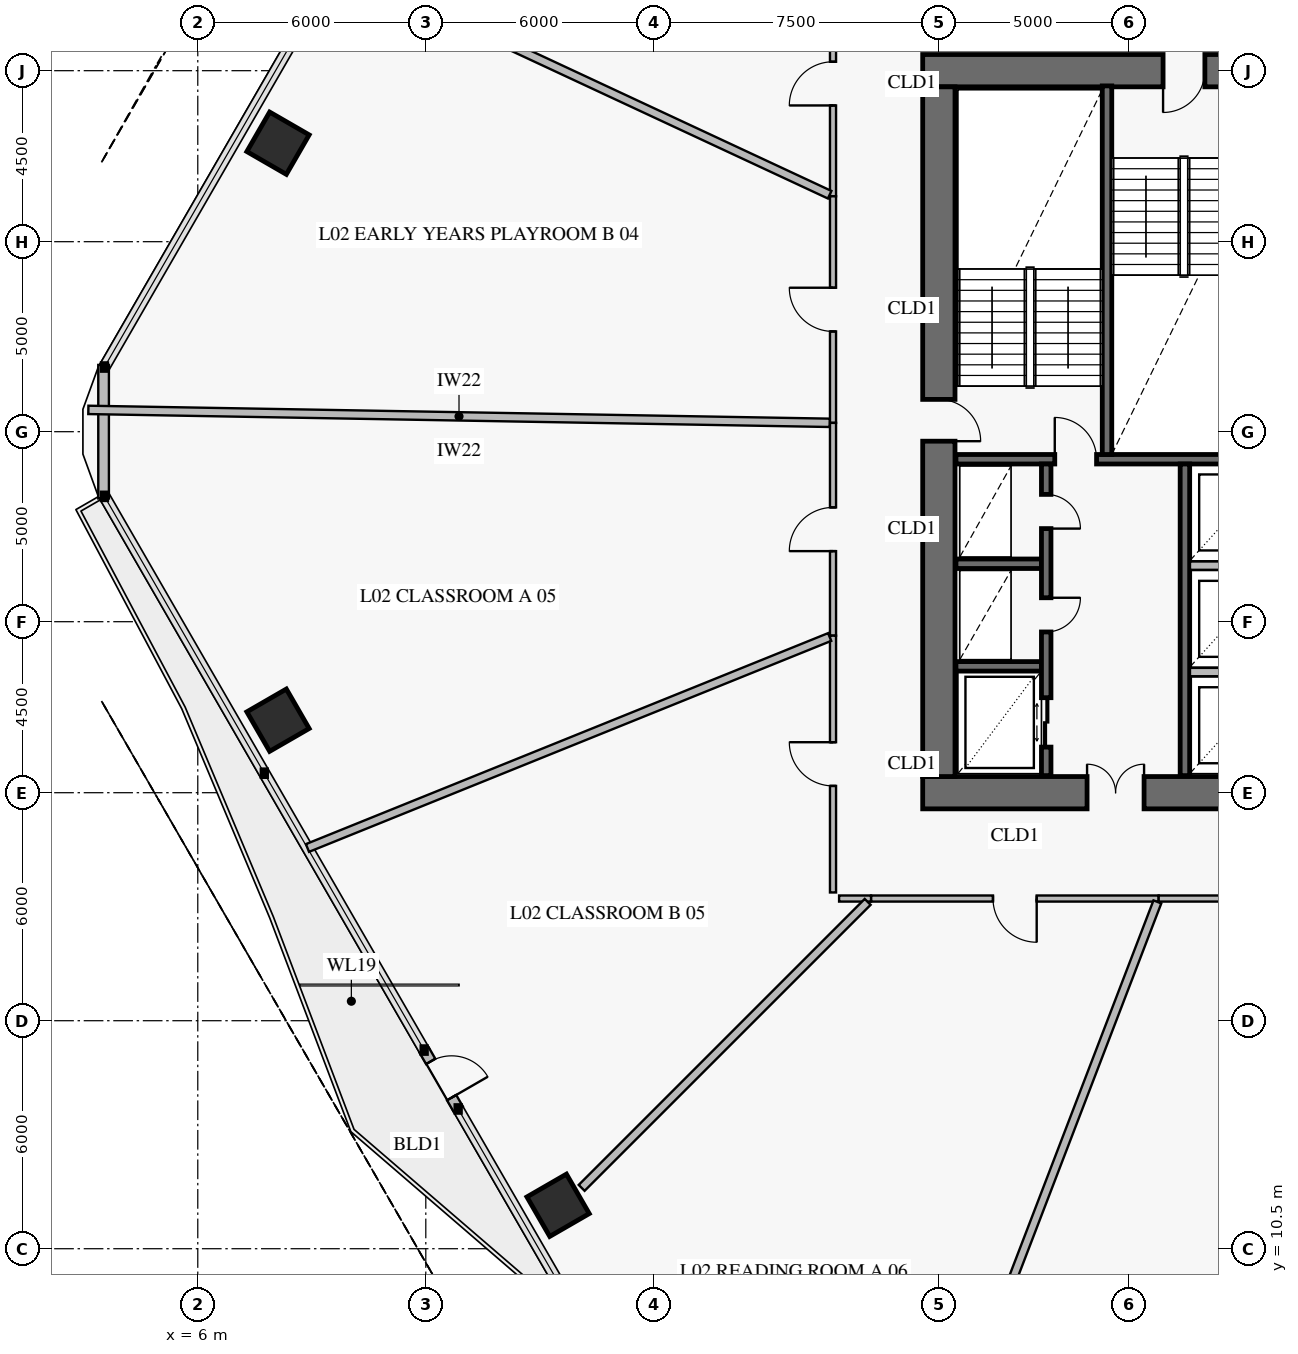
"""IFC4 building model, lengths in metres.
Left out: names, types, materials, properties, quantities, classifications, styles, units other than length and angle.
Written with IfcOpenShell. Run it as: python <this file> out.ifc"""

import sys

from ifc_helpers import new_model, si_unit, direction, frame, frame_2d, origin, origin_2d, place, context, subcontext, project, spatial, rectangle, extrude, element, fill, save


model = new_model("IFC4")
c1 = context("Model", 3, precision=1e-05, world=origin(), true_north=direction((0.0, 1.0)))
c2 = subcontext(c1, "Body", "Model", "MODEL_VIEW")
j1 = project(units=[si_unit("LENGTHUNIT", "METRE"), si_unit("PLANEANGLEUNIT", "RADIAN")], contexts=[c1])
p1 = place(None, origin())
s1 = spatial("IfcSite", under=j1, at=p1, CompositionType="ELEMENT")
p2 = place(p1, origin())
s2 = spatial("IfcBuilding", under=s1, at=p2, CompositionType="ELEMENT")
p3 = place(p2, frame((0.0, 0.0, 7.8)))
s3 = spatial("IfcBuildingStorey", under=s2, at=p3, CompositionType="ELEMENT", Elevation=7.8)
p4 = place(p3, frame((25.075, 22.5, 0.0), z_axis=(0.0, 0.0, 1.0), x_axis=(1.0, 0.0, 0.0)))
e1 = element("IfcWall", 1, at=p4, inside=s3, PredefinedType="SHEAR", context=c2, shape_type="SweptSolid", body=[
    extrude(rectangle(XDim=9.975, YDim=0.85, at=frame_2d((4.988, 0.0))), origin(), (0.0, 0.0, 1.0), 4.2),
])
p5 = place(p4, frame((4.325, 0.0, 0.0)))
e2 = element("IfcOpeningElement", 2, at=p5, cuts=e1, PredefinedType="OPENING", context=c2, shape_type="SweptSolid", body=[
    extrude(rectangle(XDim=1.5, YDim=2.15, at=frame_2d((0.75, 1.075))), frame((0.0, 0.437, 0.0), z_axis=(0.0, -1.0, 0.0), x_axis=(1.0, 0.0, 0.0)), (0.0, 0.0, 1.0), 0.874),
])
p6 = place(p3, frame((36.75, 41.5, 0.0), z_axis=(0.0, 0.0, 1.0), x_axis=(-1.0, 0.0, 0.0)))
e3 = element("IfcWall", 3, at=p6, inside=s3, PredefinedType="SHEAR", context=c2, shape_type="SweptSolid", body=[
    extrude(rectangle(XDim=11.675, YDim=0.85, at=frame_2d((5.837, 0.0))), origin(), (0.0, 0.0, 1.0), 4.2),
])
p7 = place(p6, frame((4.25, 0.0, 0.0)))
e4 = element("IfcOpeningElement", 4, at=p7, cuts=e3, PredefinedType="OPENING", context=c2, shape_type="SweptSolid", body=[
    extrude(rectangle(XDim=1.1, YDim=2.15, at=frame_2d((0.55, 1.075))), frame((0.0, 0.437, 0.0), z_axis=(0.0, -1.0, 0.0), x_axis=(1.0, 0.0, 0.0)), (0.0, 0.0, 1.0), 0.874),
])
p8 = place(p3, frame((25.5, 22.925, 0.0), z_axis=(0.0, 0.0, 1.0), x_axis=(0.0, 1.0, 0.0)))
e5 = element("IfcWall", 5, at=p8, inside=s3, PredefinedType="SHEAR", context=c2, shape_type="SweptSolid", body=[
    extrude(rectangle(XDim=18.15, YDim=0.85, at=frame_2d((9.075, 0.0))), origin(), (0.0, 0.0, 1.0), 4.2),
])
p9 = place(p8, frame((8.825, 0.0, 0.0)))
e6 = element("IfcOpeningElement", 6, at=p9, cuts=e5, PredefinedType="OPENING", context=c2, shape_type="SweptSolid", body=[
    extrude(rectangle(XDim=1.1, YDim=2.15, at=frame_2d((0.55, 1.075))), frame((0.0, 0.437, 0.0), z_axis=(0.0, -1.0, 0.0), x_axis=(1.0, 0.0, 0.0)), (0.0, 0.0, 1.0), 0.874),
])
for number, where, z_axis, x_axis in (
    (7, (8.111, 39.592, 0.0), (0.0, 0.0, 1.0), (-0.5, -0.866, 0.0)),
    (8, (8.111, 24.408, 0.0), (0.0, 0.0, 1.0), (0.5, -0.866, 0.0)),
    (9, (15.481, 11.643, 0.0), (0.0, 0.0, 1.0), (0.5, -0.866, 0.0)),
):
    element("IfcColumn", number, at=place(p3, frame(where, z_axis=z_axis, x_axis=x_axis)), inside=s3, PredefinedType="COLUMN", context=c2, shape_type="SweptSolid", body=[
        extrude(rectangle(XDim=1.2, YDim=1.2, at=origin_2d()), origin(), (0.0, 0.0, 1.0), 3.92),
    ])
p10 = place(p3, frame((12.852, 14.177, 0.0), z_axis=(0.0, 0.0, 1.0), x_axis=(-0.499982180423, 0.866035691677, 0.0)))
e10 = element("IfcWall", 10, at=p10, inside=s3, PredefinedType="SOLIDWALL", context=c2, shape_type="SweptSolid", body=[
    extrude(rectangle(XDim=1.79, YDim=0.28, at=frame_2d((0.895, 0.0))), origin(), (0.0, 0.0, 1.0), 3.92),
])
p11 = place(p10, frame((0.345, 0.0, 0.0)))
e11 = element("IfcOpeningElement", 11, at=p11, cuts=e10, PredefinedType="OPENING", context=c2, shape_type="SweptSolid", body=[
    extrude(rectangle(XDim=1.1, YDim=2.2, at=frame_2d((0.55, 1.1))), frame((0.0, 0.152, 0.0), z_axis=(0.0, -1.0, 0.0), x_axis=(1.0, 0.0, 0.0)), (0.0, 0.0, 1.0), 0.304),
])
p12 = place(p3, frame((3.521, 30.242, 0.0), z_axis=(0.0, 0.0, 1.0), x_axis=(0.0, 1.0, 0.0)))
e12 = element("IfcWall", 12, at=p12, inside=s3, PredefinedType="SOLIDWALL", context=c2, shape_type="SweptSolid", body=[
    extrude(rectangle(XDim=3.515, YDim=0.28, at=frame_2d((1.758, 0.0))), origin(), (0.0, 0.0, 1.0), 3.92),
])
p13 = place(p3, frame((25.95, 31.275, 0.0), z_axis=(0.0, 0.0, 1.0), x_axis=(1.0, 0.0, 0.0)))
e13 = element("IfcWall", 13, at=p13, inside=s3, PredefinedType="SOLIDWALL", context=c2, shape_type="SweptSolid", body=[
    extrude(rectangle(XDim=20.1, YDim=0.25, at=frame_2d((10.05, 0.0))), origin(), (0.0, 0.0, 1.0), 4.2),
])
p14 = place(p13, frame((2.6, 0.0, 0.0)))
e14 = element("IfcOpeningElement", 14, at=p14, cuts=e13, PredefinedType="OPENING", context=c2, shape_type="SweptSolid", body=[
    extrude(rectangle(XDim=1.1, YDim=2.15, at=frame_2d((0.55, 1.075))), frame((0.0, 0.137, 0.0), z_axis=(0.0, -1.0, 0.0), x_axis=(1.0, 0.0, 0.0)), (0.0, 0.0, 1.0), 0.274),
])
p15 = place(p13, frame((10.6, 0.0, 0.0)))
e15 = element("IfcOpeningElement", 15, at=p15, cuts=e13, PredefinedType="OPENING", context=c2, shape_type="SweptSolid", body=[
    extrude(rectangle(XDim=1.1, YDim=2.15, at=frame_2d((0.55, 1.075))), frame((0.0, 0.137, 0.0), z_axis=(0.0, -1.0, 0.0), x_axis=(1.0, 0.0, 0.0)), (0.0, 0.0, 1.0), 0.274),
])
p16 = place(p13, frame((16.35, 0.0, 0.0)))
e16 = element("IfcOpeningElement", 16, at=p16, cuts=e13, PredefinedType="OPENING", context=c2, shape_type="SweptSolid", body=[
    extrude(rectangle(XDim=1.1, YDim=2.15, at=frame_2d((0.55, 1.075))), frame((0.0, 0.137, 0.0), z_axis=(0.0, -1.0, 0.0), x_axis=(1.0, 0.0, 0.0)), (0.0, 0.0, 1.0), 0.274),
])
p17 = place(p3, frame((29.925, 31.4, 0.0), z_axis=(0.0, 0.0, 1.0), x_axis=(0.0, 1.0, 0.0)))
e17 = element("IfcWall", 17, at=p17, inside=s3, PredefinedType="SOLIDWALL", context=c2, shape_type="SweptSolid", body=[
    extrude(rectangle(XDim=9.7, YDim=0.25, at=frame_2d((4.85, 0.0))), origin(), (0.0, 0.0, 1.0), 4.2),
])
for number, where, z_axis, x_axis in (
    (18, (25.95, 25.825, 0.0), (0.0, 0.0, 1.0), (1.0, 0.0, 0.0)),
    (19, (25.95, 28.525, 0.0), (0.0, 0.0, 1.0), (1.0, 0.0, 0.0)),
):
    element("IfcWall", number, at=place(p3, frame(where, z_axis=z_axis, x_axis=x_axis)), inside=s3, PredefinedType="SOLIDWALL", context=c2, shape_type="SweptSolid", body=[
        extrude(rectangle(XDim=2.25, YDim=0.25, at=frame_2d((1.125, 0.0))), origin(), (0.0, 0.0, 1.0), 4.2),
    ])
p18 = place(p3, frame((28.325, 22.95, 0.0), z_axis=(0.0, 0.0, 1.0), x_axis=(0.0, 1.0, 0.0)))
e20 = element("IfcWall", 20, at=p18, inside=s3, PredefinedType="SOLIDWALL", context=c2, shape_type="SweptSolid", body=[
    extrude(rectangle(XDim=8.2, YDim=0.25, at=frame_2d((4.1, 0.0))), origin(), (0.0, 0.0, 1.0), 4.2),
])
p19 = place(p18, frame((0.75, 0.0, 0.0)))
e21 = element("IfcOpeningElement", 21, at=p19, cuts=e20, PredefinedType="OPENING", context=c2, shape_type="SweptSolid", body=[
    extrude(rectangle(XDim=1.3, YDim=2.3, at=frame_2d((0.65, 1.15))), frame((0.0, 0.137, 0.0), z_axis=(0.0, -1.0, 0.0), x_axis=(1.0, 0.0, 0.0)), (0.0, 0.0, 1.0), 0.274),
])
p20 = place(p18, frame((3.78, 0.0, 0.0)))
e22 = element("IfcOpeningElement", 22, at=p20, cuts=e20, PredefinedType="OPENING", context=c2, shape_type="SweptSolid", body=[
    extrude(rectangle(XDim=0.9, YDim=2.1, at=frame_2d((0.45, 1.05))), frame((0.0, 0.137, 0.0), z_axis=(0.0, -1.0, 0.0), x_axis=(1.0, 0.0, 0.0)), (0.0, 0.0, 1.0), 0.274),
])
p21 = place(p18, frame((6.5, 0.0, 0.0)))
e23 = element("IfcOpeningElement", 23, at=p21, cuts=e20, PredefinedType="OPENING", context=c2, shape_type="SweptSolid", body=[
    extrude(rectangle(XDim=0.9, YDim=2.1, at=frame_2d((0.45, 1.05))), frame((0.0, 0.137, 0.0), z_axis=(0.0, -1.0, 0.0), x_axis=(1.0, 0.0, 0.0)), (0.0, 0.0, 1.0), 0.274),
])
p22 = place(p3, frame((31.975, 22.95, 0.0), z_axis=(0.0, 0.0, 1.0), x_axis=(0.0, 1.0, 0.0)))
e24 = element("IfcWall", 24, at=p22, inside=s3, PredefinedType="SOLIDWALL", context=c2, shape_type="SweptSolid", body=[
    extrude(rectangle(XDim=8.2, YDim=0.25, at=frame_2d((4.1, 0.0))), origin(), (0.0, 0.0, 1.0), 4.2),
])
p23 = place(p3, frame((22.715, 44.125, 0.0), z_axis=(0.0, 0.0, 1.0), x_axis=(0.0, -1.0, 0.0)))
e25 = element("IfcWall", 25, at=p23, inside=s3, PredefinedType="PARTITIONING", context=c2, shape_type="SweptSolid", body=[
    extrude(rectangle(XDim=5.93, YDim=0.16, at=frame_2d((2.965, 0.0))), origin(), (0.0, 0.0, 1.0), 3.92),
])
p24 = place(p23, frame((2.39, 0.0, 0.0)))
e26 = element("IfcOpeningElement", 26, at=p24, cuts=e25, PredefinedType="OPENING", context=c2, shape_type="SweptSolid", body=[
    extrude(rectangle(XDim=1.15, YDim=2.2, at=frame_2d((0.575, 1.1))), frame((0.0, 0.092, 0.0), z_axis=(0.0, -1.0, 0.0), x_axis=(1.0, 0.0, 0.0)), (0.0, 0.0, 1.0), 0.184),
])
p25 = place(p3, frame((22.715, 38.195, 0.0), z_axis=(0.0, 0.0, 1.0), x_axis=(0.0, -1.0, 0.0)))
e27 = element("IfcWall", 27, at=p25, inside=s3, PredefinedType="PARTITIONING", context=c2, shape_type="SweptSolid", body=[
    extrude(rectangle(XDim=5.963, YDim=0.16, at=frame_2d((2.981, 0.0))), origin(), (0.0, 0.0, 1.0), 3.22),
])
p26 = place(p25, frame((2.406, 0.0, 0.0)))
e28 = element("IfcOpeningElement", 28, at=p26, cuts=e27, PredefinedType="OPENING", context=c2, shape_type="SweptSolid", body=[
    extrude(rectangle(XDim=1.15, YDim=2.2, at=frame_2d((0.575, 1.1))), frame((0.0, 0.092, 0.0), z_axis=(0.0, -1.0, 0.0), x_axis=(1.0, 0.0, 0.0)), (0.0, 0.0, 1.0), 0.184),
])
p27 = place(p3, frame((22.715, 32.232, 0.0), z_axis=(0.0, 0.0, 1.0), x_axis=(0.0, -1.0, 0.0)))
e29 = element("IfcWall", 29, at=p27, inside=s3, PredefinedType="PARTITIONING", context=c2, shape_type="SweptSolid", body=[
    extrude(rectangle(XDim=5.599, YDim=0.16, at=frame_2d((2.8, 0.0))), origin(), (0.0, 0.0, 1.0), 3.22),
])
p28 = place(p27, frame((2.225, 0.0, 0.0)))
e30 = element("IfcOpeningElement", 30, at=p28, cuts=e29, PredefinedType="OPENING", context=c2, shape_type="SweptSolid", body=[
    extrude(rectangle(XDim=1.15, YDim=2.2, at=frame_2d((0.575, 1.1))), frame((0.0, 0.092, 0.0), z_axis=(0.0, -1.0, 0.0), x_axis=(1.0, 0.0, 0.0)), (0.0, 0.0, 1.0), 0.184),
])
p29 = place(p3, frame((22.715, 26.633, 0.0), z_axis=(0.0, 0.0, 1.0), x_axis=(0.0, -1.0, 0.0)))
e31 = element("IfcWall", 31, at=p29, inside=s3, PredefinedType="PARTITIONING", context=c2, shape_type="SweptSolid", body=[
    extrude(rectangle(XDim=6.758, YDim=0.16, at=frame_2d((3.379, 0.0))), origin(), (0.0, 0.0, 1.0), 3.92),
])
p30 = place(p29, frame((2.804, 0.0, 0.0)))
e32 = element("IfcOpeningElement", 32, at=p30, cuts=e31, PredefinedType="OPENING", context=c2, shape_type="SweptSolid", body=[
    extrude(rectangle(XDim=1.15, YDim=2.2, at=frame_2d((0.575, 1.1))), frame((0.0, 0.092, 0.0), z_axis=(0.0, -1.0, 0.0), x_axis=(1.0, 0.0, 0.0)), (0.0, 0.0, 1.0), 0.184),
])
p31 = place(p3, frame((23.715, 19.715, 0.0), z_axis=(0.0, 0.0, 1.0), x_axis=(1.0, 0.0, 0.0)))
e33 = element("IfcWall", 33, at=p31, inside=s3, PredefinedType="PARTITIONING", context=c2, shape_type="SweptSolid", body=[
    extrude(rectangle(XDim=7.569, YDim=0.16, at=frame_2d((3.785, 0.0))), origin(), (0.0, 0.0, 1.0), 3.22),
])
p32 = place(p31, frame((3.21, 0.0, 0.0)))
e34 = element("IfcOpeningElement", 34, at=p32, cuts=e33, PredefinedType="OPENING", context=c2, shape_type="SweptSolid", body=[
    extrude(rectangle(XDim=1.15, YDim=2.2, at=frame_2d((0.575, 1.1))), frame((0.0, 0.092, 0.0), z_axis=(0.0, -1.0, 0.0), x_axis=(1.0, 0.0, 0.0)), (0.0, 0.0, 1.0), 0.184),
])
p33 = place(p3, frame((31.284, 19.715, 0.0), z_axis=(0.0, 0.0, 1.0), x_axis=(1.0, 0.0, 0.0)))
e35 = element("IfcWall", 35, at=p33, inside=s3, PredefinedType="PARTITIONING", context=c2, shape_type="SweptSolid", body=[
    extrude(rectangle(XDim=5.36, YDim=0.16, at=frame_2d((2.68, 0.0))), origin(), (0.0, 0.0, 1.0), 3.22),
])
p34 = place(p33, frame((2.105, 0.0, 0.0)))
e36 = element("IfcOpeningElement", 36, at=p34, cuts=e35, PredefinedType="OPENING", context=c2, shape_type="SweptSolid", body=[
    extrude(rectangle(XDim=1.15, YDim=2.2, at=frame_2d((0.575, 1.1))), frame((0.0, 0.092, 0.0), z_axis=(0.0, -1.0, 0.0), x_axis=(1.0, 0.0, 0.0)), (0.0, 0.0, 1.0), 0.184),
])
for number, where, z_axis, x_axis in (
    (37, (32.108, 25.675, 0.0), (0.0, 0.0, 1.0), (1.0, 0.0, 0.0)),
    (38, (32.108, 28.475, 0.0), (0.0, 0.0, 1.0), (1.0, 0.0, 0.0)),
):
    element("IfcWall", number, at=place(p3, frame(where, z_axis=z_axis, x_axis=x_axis)), inside=s3, PredefinedType="PARTITIONING", context=c2, shape_type="SweptSolid", body=[
        extrude(rectangle(XDim=2.284, YDim=0.22, at=frame_2d((1.142, 0.0))), origin(), (0.0, 0.0, 1.0), 3.92),
    ])
p35 = place(p3, frame((22.627, 38.236, 0.0), z_axis=(0.0, 0.0, 1.0), x_axis=(-0.906309468756, 0.422614655263, 0.0)))
e39 = element("IfcWall", 39, at=p35, inside=s3, PredefinedType="PARTITIONING", context=c2, shape_type="SweptSolid", body=[
    extrude(rectangle(XDim=14.313, YDim=0.22, at=frame_2d((7.157, 0.0))), origin(), (0.0, 0.0, 1.0), 3.17),
])
p36 = place(p3, frame((22.627, 32.233, 0.0), z_axis=(0.0, 0.0, 1.0), x_axis=(-0.999847613209, 0.017457100559, 0.0)))
e40 = element("IfcWall", 40, at=p36, inside=s3, PredefinedType="PARTITIONING", context=c2, shape_type="SweptSolid", body=[
    extrude(rectangle(XDim=19.509, YDim=0.22, at=frame_2d((9.755, 0.0))), origin(), (0.0, 0.0, 1.0), 3.17),
])
p37 = place(p3, frame((22.627, 26.597, 0.0), z_axis=(0.0, 0.0, 1.0), x_axis=(-0.927186166431, -0.3746008713, 0.0)))
e41 = element("IfcWall", 41, at=p37, inside=s3, PredefinedType="PARTITIONING", context=c2, shape_type="SweptSolid", body=[
    extrude(rectangle(XDim=14.82, YDim=0.22, at=frame_2d((7.41, 0.0))), origin(), (0.0, 0.0, 1.0), 3.17),
])
p38 = place(p3, frame((22.875, 19.715, 0.0), z_axis=(0.0, 0.0, 1.0), x_axis=(1.0, 0.0, 0.0)))
e42 = element("IfcWall", 42, at=p38, inside=s3, PredefinedType="PARTITIONING", context=c2, shape_type="SweptSolid", body=[
    extrude(rectangle(XDim=0.84, YDim=0.16, at=frame_2d((0.42, 0.0))), origin(), (0.0, 0.0, 1.0), 3.22),
])
p39 = place(p3, frame((23.627, 19.627, 0.0), z_axis=(0.0, 0.0, 1.0), x_axis=(-0.707106781187, -0.707106781187, 0.0)))
e43 = element("IfcWall", 43, at=p39, inside=s3, PredefinedType="PARTITIONING", context=c2, shape_type="SweptSolid", body=[
    extrude(rectangle(XDim=10.643, YDim=0.22, at=frame_2d((5.322, 0.0))), origin(), (0.0, 0.0, 1.0), 3.22),
])
p40 = place(p3, frame((31.25, 19.627, 0.0), z_axis=(0.0, 0.0, 1.0), x_axis=(-0.358374904207, -0.933577756823, 0.0)))
e44 = element("IfcWall", 44, at=p40, inside=s3, PredefinedType="PARTITIONING", context=c2, shape_type="SweptSolid", body=[
    extrude(rectangle(XDim=17.765, YDim=0.22, at=frame_2d((8.883, 0.0))), origin(), (0.0, 0.0, 1.0), 3.17),
])
p41 = place(p11, frame((1.1, 0.0, 0.0), z_axis=(0.0, 0.0, 1.0), x_axis=(-1.0, 0.0, 0.0)))
e45 = element("IfcDoor", 45, at=p41, inside=s3, OperationType="SINGLE_SWING_RIGHT", PredefinedType="DOOR", context=c2, shape_type="SweptSolid", body=[
    extrude(rectangle(XDim=1.1, YDim=2.2, at=frame_2d((0.55, 1.1))), frame((0.0, 0.025, 0.0), z_axis=(0.0, -1.0, 0.0), x_axis=(1.0, 0.0, 0.0)), (0.0, 0.0, 1.0), 0.05),
])
fill(e11, e45)
p42 = place(p9, frame((1.1, 0.0, 0.0), z_axis=(0.0, 0.0, 1.0), x_axis=(-1.0, 0.0, 0.0)))
e46 = element("IfcDoor", 46, at=p42, inside=s3, OperationType="SINGLE_SWING_RIGHT", PredefinedType="USERDEFINED", context=c2, shape_type="SweptSolid", body=[
    extrude(rectangle(XDim=1.1, YDim=2.15, at=frame_2d((0.55, 1.075))), frame((0.0, 0.025, 0.0), z_axis=(0.0, -1.0, 0.0), x_axis=(1.0, 0.0, 0.0)), (0.0, 0.0, 1.0), 0.05),
])
fill(e6, e46)
p43 = place(p7, origin())
e47 = element("IfcDoor", 47, at=p43, inside=s3, OperationType="SINGLE_SWING_RIGHT", PredefinedType="USERDEFINED", context=c2, shape_type="SweptSolid", body=[
    extrude(rectangle(XDim=1.1, YDim=2.15, at=frame_2d((0.55, 1.075))), frame((0.0, 0.025, 0.0), z_axis=(0.0, -1.0, 0.0), x_axis=(1.0, 0.0, 0.0)), (0.0, 0.0, 1.0), 0.05),
])
fill(e4, e47)
p44 = place(p5, origin())
e48 = element("IfcDoor", 48, at=p44, inside=s3, OperationType="DOUBLE_DOOR_SINGLE_SWING", PredefinedType="DOOR", context=c2, shape_type="SweptSolid", body=[
    extrude(rectangle(XDim=1.5, YDim=2.15, at=frame_2d((0.75, 1.075))), frame((0.0, 0.025, 0.0), z_axis=(0.0, -1.0, 0.0), x_axis=(1.0, 0.0, 0.0)), (0.0, 0.0, 1.0), 0.05),
])
fill(e2, e48)
p45 = place(p14, origin())
e49 = element("IfcDoor", 49, at=p45, inside=s3, OperationType="SINGLE_SWING_LEFT", PredefinedType="USERDEFINED", context=c2, shape_type="SweptSolid", body=[
    extrude(rectangle(XDim=1.1, YDim=2.15, at=frame_2d((0.55, 1.075))), frame((0.0, 0.025, 0.0), z_axis=(0.0, -1.0, 0.0), x_axis=(1.0, 0.0, 0.0)), (0.0, 0.0, 1.0), 0.05),
])
fill(e14, e49)
p46 = place(p19, frame((1.3, 0.0, 0.0), z_axis=(0.0, 0.0, 1.0), x_axis=(-1.0, 0.0, 0.0)))
e50 = element("IfcDoor", 50, at=p46, inside=s3, OperationType="DOUBLE_DOOR_SLIDING", PredefinedType="DOOR", context=c2, shape_type="SweptSolid", body=[
    extrude(rectangle(XDim=1.3, YDim=2.3, at=frame_2d((0.65, 1.15))), frame((0.0, 0.025, 0.0), z_axis=(0.0, -1.0, 0.0), x_axis=(1.0, 0.0, 0.0)), (0.0, 0.0, 1.0), 0.05),
])
fill(e21, e50)
p47 = place(p20, frame((0.9, 0.0, 0.0), z_axis=(0.0, 0.0, 1.0), x_axis=(-1.0, 0.0, 0.0)))
e51 = element("IfcDoor", 51, at=p47, inside=s3, OperationType="SINGLE_SWING_LEFT", PredefinedType="DOOR", context=c2, shape_type="SweptSolid", body=[
    extrude(rectangle(XDim=0.9, YDim=2.1, at=frame_2d((0.45, 1.05))), frame((0.0, 0.025, 0.0), z_axis=(0.0, -1.0, 0.0), x_axis=(1.0, 0.0, 0.0)), (0.0, 0.0, 1.0), 0.05),
])
fill(e22, e51)
p48 = place(p21, frame((0.9, 0.0, 0.0), z_axis=(0.0, 0.0, 1.0), x_axis=(-1.0, 0.0, 0.0)))
e52 = element("IfcDoor", 52, at=p48, inside=s3, OperationType="SINGLE_SWING_RIGHT", PredefinedType="DOOR", context=c2, shape_type="SweptSolid", body=[
    extrude(rectangle(XDim=0.9, YDim=2.1, at=frame_2d((0.45, 1.05))), frame((0.0, 0.025, 0.0), z_axis=(0.0, -1.0, 0.0), x_axis=(1.0, 0.0, 0.0)), (0.0, 0.0, 1.0), 0.05),
])
fill(e23, e52)
p49 = place(p24, frame((1.15, 0.0, 0.0), z_axis=(0.0, 0.0, 1.0), x_axis=(-1.0, 0.0, 0.0)))
e53 = element("IfcDoor", 53, at=p49, inside=s3, OperationType="SINGLE_SWING_LEFT", PredefinedType="DOOR", context=c2, shape_type="SweptSolid", body=[
    extrude(rectangle(XDim=1.15, YDim=2.2, at=frame_2d((0.575, 1.1))), frame((0.0, 0.025, 0.0), z_axis=(0.0, -1.0, 0.0), x_axis=(1.0, 0.0, 0.0)), (0.0, 0.0, 1.0), 0.05),
])
fill(e26, e53)
p50 = place(p26, frame((1.15, 0.0, 0.0), z_axis=(0.0, 0.0, 1.0), x_axis=(-1.0, 0.0, 0.0)))
e54 = element("IfcDoor", 54, at=p50, inside=s3, OperationType="SINGLE_SWING_RIGHT", PredefinedType="DOOR", context=c2, shape_type="SweptSolid", body=[
    extrude(rectangle(XDim=1.15, YDim=2.2, at=frame_2d((0.575, 1.1))), frame((0.0, 0.025, 0.0), z_axis=(0.0, -1.0, 0.0), x_axis=(1.0, 0.0, 0.0)), (0.0, 0.0, 1.0), 0.05),
])
fill(e28, e54)
p51 = place(p28, frame((1.15, 0.0, 0.0), z_axis=(0.0, 0.0, 1.0), x_axis=(-1.0, 0.0, 0.0)))
e55 = element("IfcDoor", 55, at=p51, inside=s3, OperationType="SINGLE_SWING_LEFT", PredefinedType="DOOR", context=c2, shape_type="SweptSolid", body=[
    extrude(rectangle(XDim=1.15, YDim=2.2, at=frame_2d((0.575, 1.1))), frame((0.0, 0.025, 0.0), z_axis=(0.0, -1.0, 0.0), x_axis=(1.0, 0.0, 0.0)), (0.0, 0.0, 1.0), 0.05),
])
fill(e30, e55)
p52 = place(p30, frame((1.15, 0.0, 0.0), z_axis=(0.0, 0.0, 1.0), x_axis=(-1.0, 0.0, 0.0)))
e56 = element("IfcDoor", 56, at=p52, inside=s3, OperationType="SINGLE_SWING_RIGHT", PredefinedType="DOOR", context=c2, shape_type="SweptSolid", body=[
    extrude(rectangle(XDim=1.15, YDim=2.2, at=frame_2d((0.575, 1.1))), frame((0.0, 0.025, 0.0), z_axis=(0.0, -1.0, 0.0), x_axis=(1.0, 0.0, 0.0)), (0.0, 0.0, 1.0), 0.05),
])
fill(e32, e56)
p53 = place(p32, frame((1.15, 0.0, 0.0), z_axis=(0.0, 0.0, 1.0), x_axis=(-1.0, 0.0, 0.0)))
e57 = element("IfcDoor", 57, at=p53, inside=s3, OperationType="SINGLE_SWING_LEFT", PredefinedType="DOOR", context=c2, shape_type="SweptSolid", body=[
    extrude(rectangle(XDim=1.15, YDim=2.2, at=frame_2d((0.575, 1.1))), frame((0.0, 0.025, 0.0), z_axis=(0.0, -1.0, 0.0), x_axis=(1.0, 0.0, 0.0)), (0.0, 0.0, 1.0), 0.05),
])
fill(e34, e57)
save(model, sys.argv[1])
